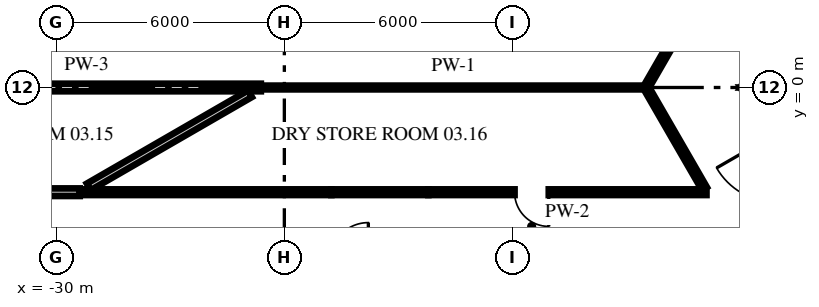
"""IFC4 building model, lengths in metres.
Left out: names, types, materials, properties, quantities, classifications, styles, units other than length and angle.
Written with IfcOpenShell. Run it as: python <this file> out.ifc"""

import sys

from ifc_helpers import new_model, si_unit, direction, frame, frame_2d, origin, place, context, subcontext, project, spatial, rectangle, extrude, source, transform, mapped, element, fill, save


model = new_model("IFC4")
c1 = context("Model", 3, precision=1e-05, world=origin(), true_north=direction((0.0, 1.0)))
c2 = subcontext(c1, "Body", "Model", "MODEL_VIEW")
j1 = project(units=[si_unit("LENGTHUNIT", "METRE"), si_unit("PLANEANGLEUNIT", "RADIAN")], contexts=[c1])
p1 = place(None, origin())
s1 = spatial("IfcSite", under=j1, at=p1, CompositionType="ELEMENT")
p2 = place(p1, origin())
s2 = spatial("IfcBuilding", under=s1, at=p2, CompositionType="ELEMENT")
p3 = place(p2, frame((0.0, 0.0, 16.0)))
s3 = spatial("IfcBuildingStorey", under=s2, at=p3, CompositionType="ELEMENT", Elevation=16.0)
p4 = place(p3, frame((-14.458, -0.043, 0.0), z_axis=(0.0, 0.0, 1.0), x_axis=(0.499971948444, -0.866041598752, 0.0)))
e1 = element("IfcWall", 1, at=p4, inside=s3, PredefinedType="PARTITIONING", context=c2, shape_type="SweptSolid", body=[
    extrude(rectangle(XDim=3.021, YDim=0.15, at=frame_2d((1.511, 0.0))), origin(), (0.0, 0.0, 1.0), 4.1),
])
p5 = place(p3, frame((-35.68, -2.755, 0.0), z_axis=(0.0, 0.0, 1.0), x_axis=(1.0, 0.0, 0.0)))
e2 = element("IfcWall", 2, at=p5, inside=s3, PredefinedType="PARTITIONING", context=c2, shape_type="SweptSolid", body=[
    extrude(rectangle(XDim=6.296, YDim=0.2, at=frame_2d((3.148, 0.0))), origin(), (0.0, 0.0, 1.0), 4.1),
])
p6 = place(p5, frame((4.14, 0.0, 0.0)))
e3 = element("IfcOpeningElement", 3, at=p6, cuts=e2, PredefinedType="OPENING", context=c2, shape_type="SweptSolid", body=[
    extrude(rectangle(XDim=1.0, YDim=2.1, at=frame_2d((0.5, 1.05))), frame((0.0, 0.11, 0.0), z_axis=(0.0, -1.0, 0.0), x_axis=(1.0, 0.0, 0.0)), (0.0, 0.0, 1.0), 0.22),
])
p7 = place(p3, frame((-29.384, -2.755, 0.0), z_axis=(0.0, 0.0, 1.0), x_axis=(1.0, 0.0, 0.0)))
e4 = element("IfcWall", 4, at=p7, inside=s3, PredefinedType="PARTITIONING", context=c2, shape_type="SweptSolid", body=[
    extrude(rectangle(XDim=6.621, YDim=0.15, at=frame_2d((3.311, 0.0))), origin(), (0.0, 0.0, 1.0), 4.1),
])
m1 = source(origin(), c2, "Body", "SweptSolid", [
    extrude(rectangle(XDim=2.553, YDim=0.15, at=frame_2d((1.276, 0.0))), origin(), (0.0, 0.0, 1.0), 3.158),
])
p8 = place(p3, frame((-22.763, -2.755, 0.0), z_axis=(0.0, 0.0, 1.0), x_axis=(1.0, 0.0, 0.0)))
e5 = element("IfcWall", 5, at=p8, inside=s3, PredefinedType="PARTITIONING", context=c2, shape_type="MappedRepresentation", body=[
    mapped(m1, transform((0.0, 0.0, 0.0), scale=1.0)),
])
p9 = place(p3, frame((-20.21, -2.755, 0.0), z_axis=(0.0, 0.0, 1.0), x_axis=(1.0, 0.0, 0.0)))
e6 = element("IfcWall", 6, at=p9, inside=s3, PredefinedType="PARTITIONING", context=c2, shape_type="SweptSolid", body=[
    extrude(rectangle(XDim=7.318, YDim=0.15, at=frame_2d((3.659, 0.0))), origin(), (0.0, 0.0, 1.0), 4.1),
])
p10 = place(p9, frame((2.268, 0.0, 0.0)))
e7 = element("IfcOpeningElement", 7, at=p10, cuts=e6, PredefinedType="OPENING", context=c2, shape_type="SweptSolid", body=[
    extrude(rectangle(XDim=0.9, YDim=2.1, at=frame_2d((0.45, 1.05))), frame((0.0, 0.085, 0.0), z_axis=(0.0, -1.0, 0.0), x_axis=(1.0, 0.0, 0.0)), (0.0, 0.0, 1.0), 0.17),
])
p11 = place(p3, frame((-33.795, 0.0, 0.0), z_axis=(0.0, 0.0, 1.0), x_axis=(1.0, 0.0, 0.0)))
e8 = element("IfcWall", 8, at=p11, inside=s3, PredefinedType="PARTITIONING", context=c2, shape_type="SweptSolid", body=[
    extrude(rectangle(XDim=9.177, YDim=0.2, at=frame_2d((4.589, 0.0))), origin(), (0.0, 0.0, 1.0), 4.1),
])
p12 = place(p3, frame((-24.618, 0.0, 0.0), z_axis=(0.0, 0.0, 1.0), x_axis=(1.0, 0.0, 0.0)))
e9 = element("IfcWall", 9, at=p12, inside=s3, PredefinedType="PARTITIONING", context=c2, shape_type="SweptSolid", body=[
    extrude(rectangle(XDim=10.135, YDim=0.1, at=frame_2d((5.068, 0.0))), origin(), (0.0, 0.0, 1.0), 4.1),
])
p13 = place(p3, frame((-29.148, -2.615, 0.0), z_axis=(0.0, 0.0, 1.0), x_axis=(0.866023786258, 0.500002801628, 0.0)))
e10 = element("IfcWall", 10, at=p13, inside=s3, PredefinedType="PARTITIONING", context=c2, shape_type="SweptSolid", body=[
    extrude(rectangle(XDim=4.9, YDim=0.2, at=frame_2d((2.45, 0.0))), origin(), (0.0, 0.0, 1.0), 4.1),
])
p14 = place(p3, frame((-14.473, 0.017, 0.0), z_axis=(0.0, 0.0, 1.0), x_axis=(0.500022314862, 0.866012519909, 0.0)))
e11 = element("IfcWall", 11, at=p14, inside=s3, PredefinedType="PARTITIONING", context=c2, shape_type="SweptSolid", body=[
    extrude(rectangle(XDim=4.111, YDim=0.15, at=frame_2d((2.056, 0.0))), origin(), (0.0, 0.0, 1.0), 4.1),
])
p15 = place(p14, frame((1.625, 0.0, 0.0)))
e12 = element("IfcOpeningElement", 12, at=p15, cuts=e11, PredefinedType="OPENING", context=c2, shape_type="SweptSolid", body=[
    extrude(rectangle(XDim=0.9, YDim=2.1, at=frame_2d((0.45, 1.05))), frame((0.0, 0.085, 0.0), z_axis=(0.0, -1.0, 0.0), x_axis=(1.0, 0.0, 0.0)), (0.0, 0.0, 1.0), 0.17),
])
p16 = place(p10, origin())
e13 = element("IfcDoor", 13, at=p16, inside=s3, OperationType="SINGLE_SWING_RIGHT", PredefinedType="DOOR", context=c2, shape_type="SweptSolid", body=[
    extrude(rectangle(XDim=0.9, YDim=2.1, at=frame_2d((0.45, 1.05))), frame((0.0, 0.025, 0.0), z_axis=(0.0, -1.0, 0.0), x_axis=(1.0, 0.0, 0.0)), (0.0, 0.0, 1.0), 0.05),
])
fill(e7, e13)
save(model, sys.argv[1])
